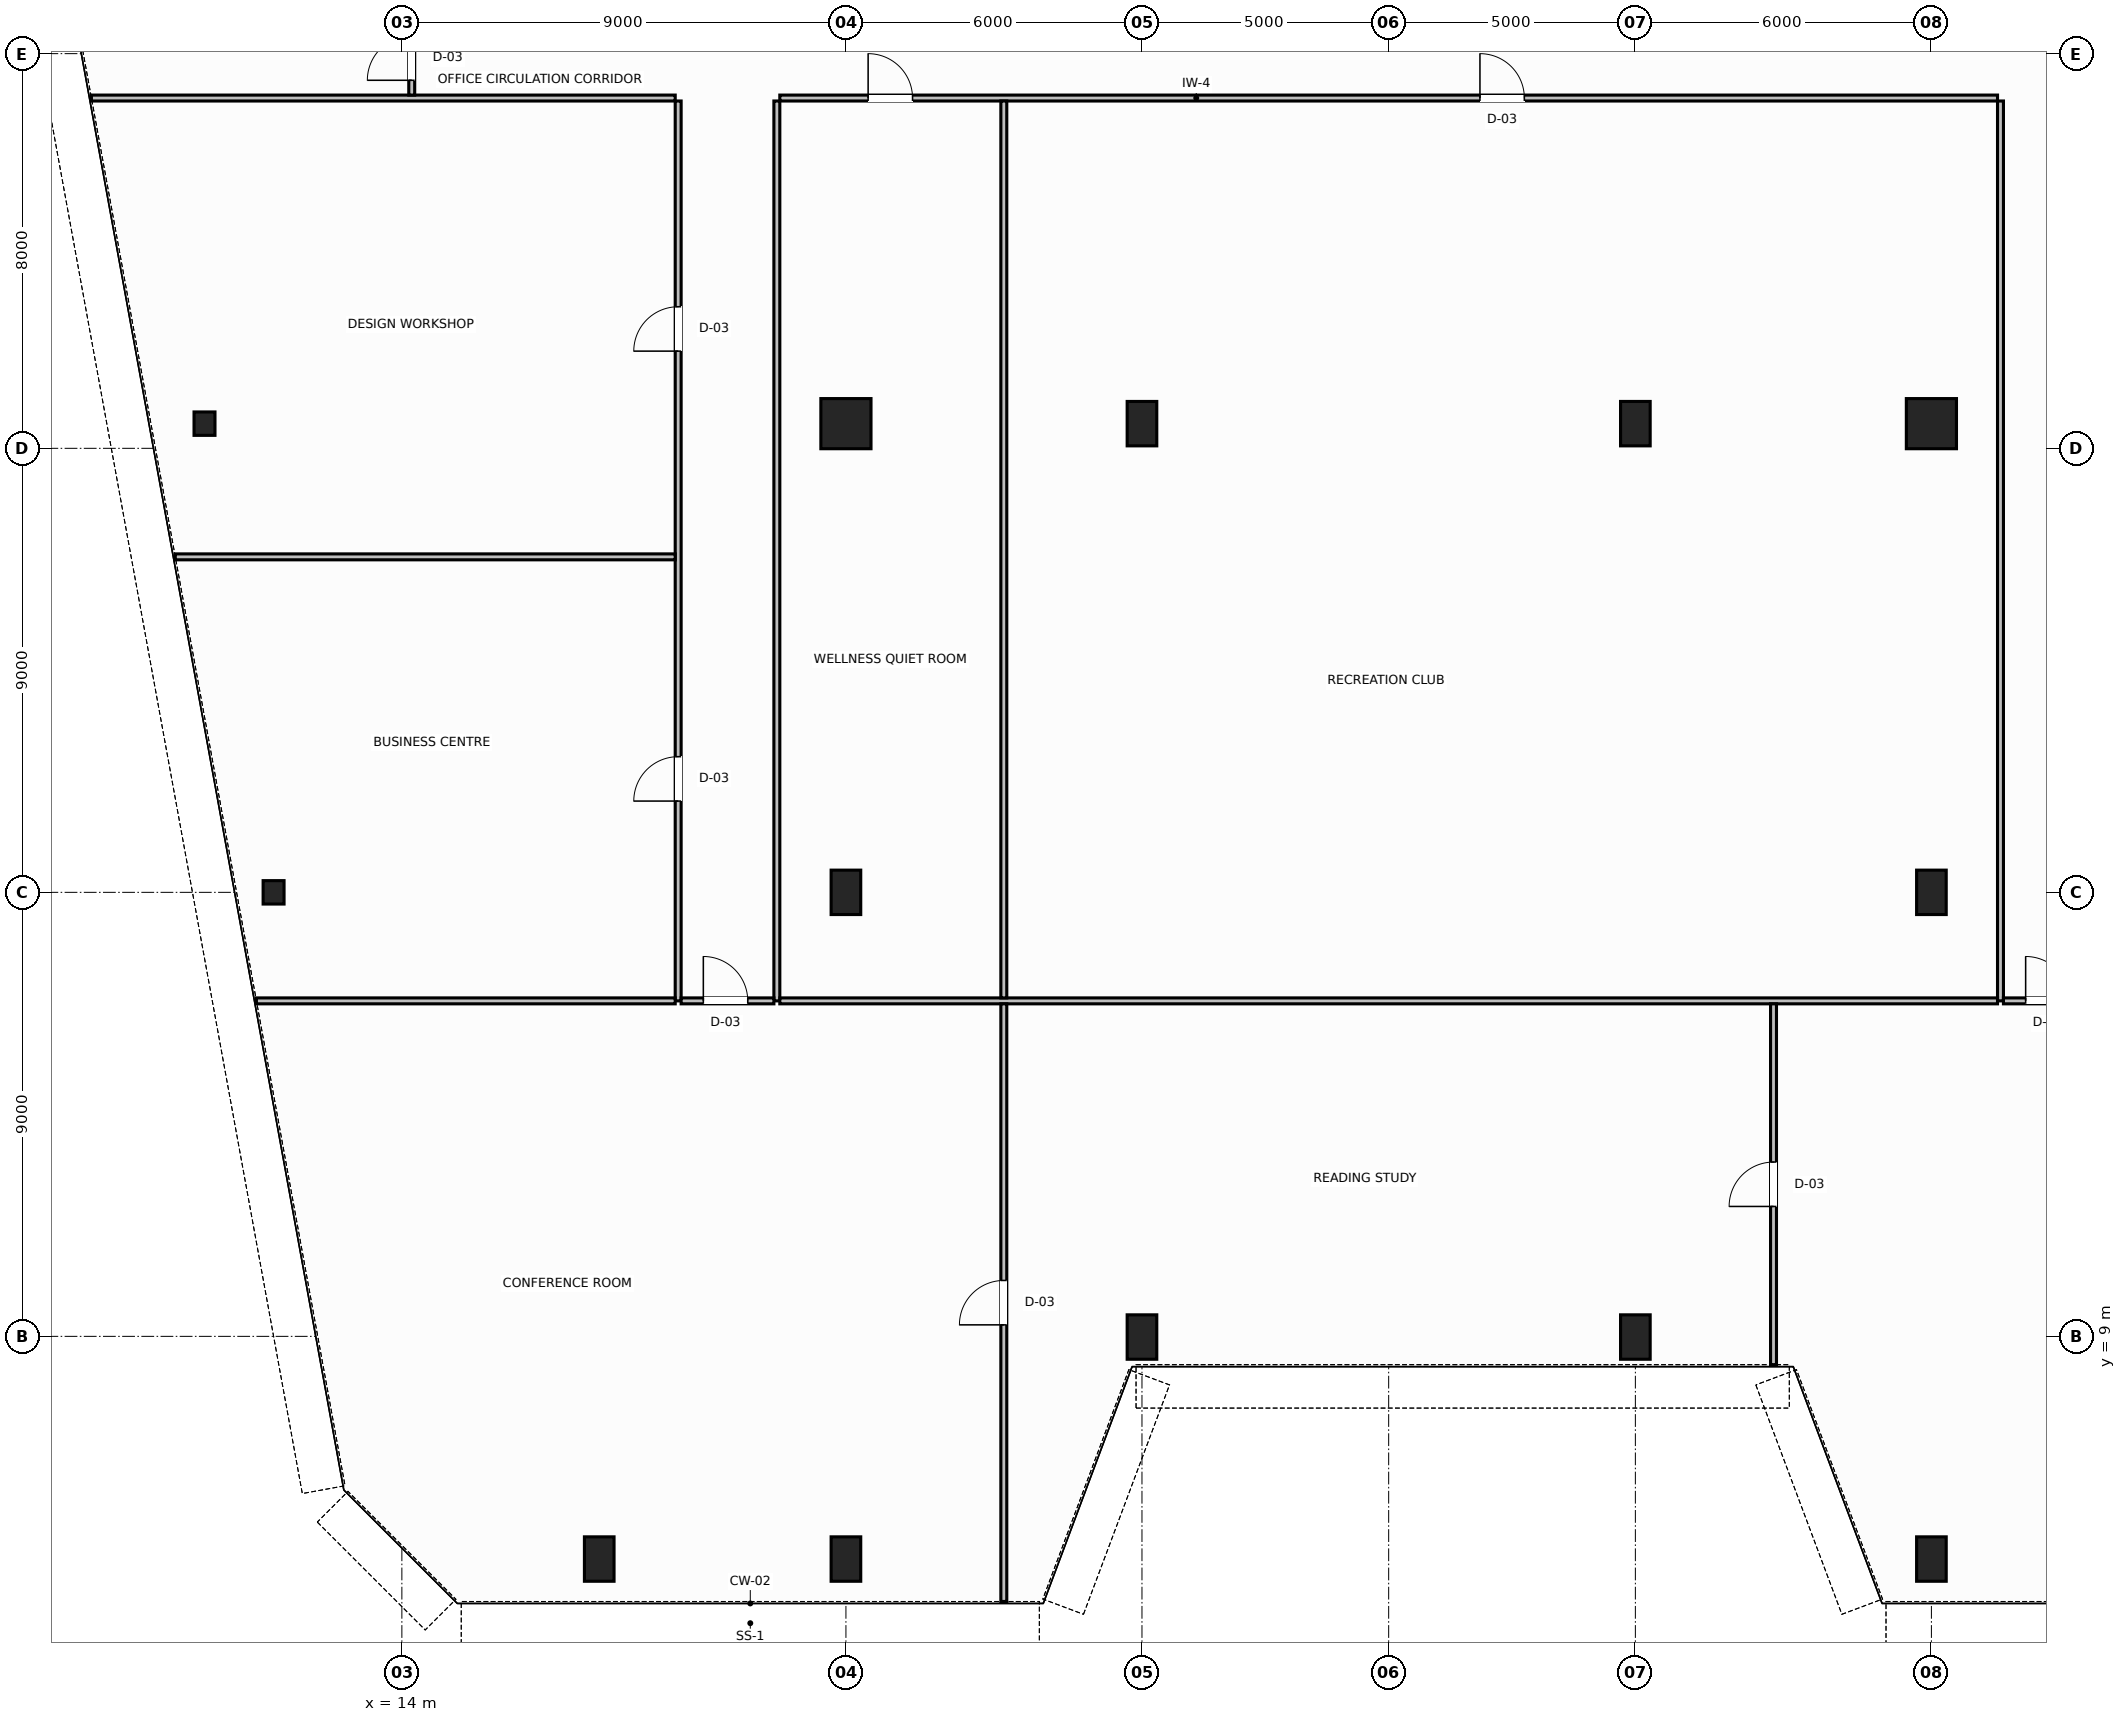
"""IFC4 building model, lengths in metres.
Left out: names, types, materials, properties, quantities, classifications, styles, units other than length and angle.
Written with IfcOpenShell. Run it as: python <this file> out.ifc"""

import sys

from ifc_helpers import new_model, si_unit, direction, frame, frame_2d, origin, origin_2d, place, context, subcontext, project, spatial, rectangle, hollow_rectangle, hollow_circle, i_section, extrude, source, transform, mapped, element, fill, save


model = new_model("IFC4")
c1 = context("Model", 3, precision=1e-05, world=origin(), true_north=direction((0.0, 1.0)))
c2 = subcontext(c1, "Body", "Model", "MODEL_VIEW")
j1 = project(units=[si_unit("LENGTHUNIT", "METRE"), si_unit("PLANEANGLEUNIT", "RADIAN")], contexts=[c1])
p1 = place(None, origin())
s1 = spatial("IfcSite", under=j1, at=p1, CompositionType="ELEMENT")
p2 = place(p1, origin())
s2 = spatial("IfcBuilding", under=s1, at=p2, CompositionType="ELEMENT")
p3 = place(p2, frame((0.0, 0.0, 88.2)))
s3 = spatial("IfcBuildingStorey", under=s2, at=p3, CompositionType="ELEMENT", Elevation=88.2)
m1 = source(origin(), c2, "Body", "SweptSolid", [
    extrude(i_section(OverallWidth=0.424, OverallDepth=0.474, WebThickness=0.047, FlangeThickness=0.065, FilletRadius=0.015, at=origin_2d()), origin(), (0.0, 0.0, 1.0), 3.8),
])
for number, where, z_axis, x_axis in (
    (1, (10.0, 27.5, 0.0), (0.0, 0.0, 1.0), (1.0, 0.0, 0.0)),
    (2, (11.4, 18.0, 0.0), (0.0, 0.0, 1.0), (1.0, 0.0, 0.0)),
):
    element("IfcColumn", number, at=place(p3, frame(where, z_axis=z_axis, x_axis=x_axis)), inside=s3, PredefinedType="COLUMN", context=c2, shape_type="MappedRepresentation", body=[
        mapped(m1, transform((0.0, 0.0, 0.0), scale=1.0)),
    ])
m2 = source(origin(), c2, "Body", "SweptSolid", [
    extrude(hollow_circle(Radius=0.508, WallThickness=0.045, at=origin_2d()), origin(), (0.0, 0.0, 1.0), 3.8),
])
p4 = place(p3, frame((23.0, 27.5, 0.0), z_axis=(0.0, 0.0, 1.0), x_axis=(1.0, 0.0, 0.0)))
e3 = element("IfcColumn", 3, at=p4, inside=s3, PredefinedType="COLUMN", context=c2, shape_type="MappedRepresentation", body=[
    mapped(m2, transform((0.0, 0.0, 0.0), scale=1.0)),
])
m3 = source(origin(), c2, "Body", "SweptSolid", [
    extrude(hollow_rectangle(XDim=0.6, YDim=0.9, WallThickness=0.04, InnerFilletRadius=0.04, OuterFilletRadius=0.08, at=origin_2d()), origin(), (0.0, 0.0, 1.0), 3.8),
])
for number, where, z_axis, x_axis in (
    (4, (29.0, 27.5, 0.0), (0.0, 0.0, 1.0), (1.0, 0.0, 0.0)),
    (5, (39.0, 27.5, 0.0), (0.0, 0.0, 1.0), (1.0, 0.0, 0.0)),
):
    element("IfcColumn", number, at=place(p3, frame(where, z_axis=z_axis, x_axis=x_axis)), inside=s3, PredefinedType="COLUMN", context=c2, shape_type="MappedRepresentation", body=[
        mapped(m3, transform((0.0, 0.0, 0.0), scale=1.0)),
    ])
p5 = place(p3, frame((45.0, 27.5, 0.0), z_axis=(0.0, 0.0, 1.0), x_axis=(1.0, 0.0, 0.0)))
e6 = element("IfcColumn", 6, at=p5, inside=s3, PredefinedType="COLUMN", context=c2, shape_type="MappedRepresentation", body=[
    mapped(m2, transform((0.0, 0.0, 0.0), scale=1.0)),
])
for number, where, z_axis, x_axis in (
    (7, (23.0, 18.0, 0.0), (0.0, 0.0, 1.0), (1.0, 0.0, 0.0)),
    (8, (45.0, 18.0, 0.0), (0.0, 0.0, 1.0), (1.0, 0.0, 0.0)),
):
    element("IfcColumn", number, at=place(p3, frame(where, z_axis=z_axis, x_axis=x_axis)), inside=s3, PredefinedType="COLUMN", context=c2, shape_type="MappedRepresentation", body=[
        mapped(m3, transform((0.0, 0.0, 0.0), scale=1.0)),
    ])
m4 = source(origin(), c2, "Body", "SweptSolid", [
    extrude(hollow_rectangle(XDim=0.6, YDim=0.9, WallThickness=0.04, InnerFilletRadius=0.04, OuterFilletRadius=0.08, at=origin_2d()), origin(), (0.0, 0.0, 1.0), 3.744),
])
for number, where, z_axis, x_axis in (
    (9, (18.0, 4.486, 0.032), (0.0, -0.064, 0.998), (1.0, 0.0, 0.0)),
    (10, (23.0, 4.486, 0.032), (0.0, -0.064, 0.998), (1.0, 0.0, 0.0)),
    (11, (29.0, 8.986, 0.032), (0.0, -0.064, 0.998), (1.0, 0.0, 0.0)),
    (12, (39.0, 8.986, 0.032), (0.0, -0.064, 0.998), (1.0, 0.0, 0.0)),
    (13, (45.0, 4.486, 0.032), (0.0, -0.064, 0.998), (1.0, 0.0, 0.0)),
):
    element("IfcColumn", number, at=place(p3, frame(where, z_axis=z_axis, x_axis=x_axis)), inside=s3, PredefinedType="COLUMN", context=c2, shape_type="MappedRepresentation", body=[
        mapped(m4, transform((0.0, 0.0, 0.0), scale=1.0)),
    ])
p6 = place(p3, frame((21.66, 34.1, 0.0), z_axis=(0.0, 0.0, 1.0), x_axis=(1.0, 0.0, 0.0)))
e14 = element("IfcWall", 14, at=p6, inside=s3, PredefinedType="PARTITIONING", context=c2, shape_type="SweptSolid", body=[
    extrude(rectangle(XDim=24.68, YDim=0.12, at=frame_2d((12.34, 0.0))), origin(), (0.0, 0.0, 1.0), 3.58),
])
p7 = place(p6, frame((1.79, 0.0, 0.0)))
e15 = element("IfcOpeningElement", 15, at=p7, cuts=e14, PredefinedType="OPENING", context=c2, shape_type="SweptSolid", body=[
    extrude(rectangle(XDim=0.9, YDim=2.15, at=frame_2d((0.45, 1.075))), frame((0.0, 0.07, 0.0), z_axis=(0.0, -1.0, 0.0), x_axis=(1.0, 0.0, 0.0)), (0.0, 0.0, 1.0), 0.14),
])
p8 = place(p6, frame((14.19, 0.0, 0.0)))
e16 = element("IfcOpeningElement", 16, at=p8, cuts=e14, PredefinedType="OPENING", context=c2, shape_type="SweptSolid", body=[
    extrude(rectangle(XDim=0.9, YDim=2.15, at=frame_2d((0.45, 1.075))), frame((0.0, 0.07, 0.0), z_axis=(0.0, -1.0, 0.0), x_axis=(1.0, 0.0, 0.0)), (0.0, 0.0, 1.0), 0.14),
])
p9 = place(p3, frame((7.708, 34.1, 0.0), z_axis=(0.0, 0.0, 1.0), x_axis=(1.0, 0.0, 0.0)))
e17 = element("IfcWall", 17, at=p9, inside=s3, PredefinedType="PARTITIONING", context=c2, shape_type="SweptSolid", body=[
    extrude(rectangle(XDim=11.832, YDim=0.12, at=frame_2d((5.916, 0.0))), origin(), (0.0, 0.0, 1.0), 3.58),
])
p10 = place(p3, frame((14.2, 34.16, 0.0), z_axis=(0.0, 0.0, 1.0), x_axis=(0.0, 1.0, 0.0)))
e18 = element("IfcWall", 18, at=p10, inside=s3, PredefinedType="PARTITIONING", context=c2, shape_type="SweptSolid", body=[
    extrude(rectangle(XDim=2.28, YDim=0.12, at=frame_2d((1.14, 0.0))), origin(), (0.0, 0.0, 1.0), 3.58),
])
p11 = place(p10, frame((0.3, 0.0, 0.0)))
e19 = element("IfcOpeningElement", 19, at=p11, cuts=e18, PredefinedType="OPENING", context=c2, shape_type="SweptSolid", body=[
    extrude(rectangle(XDim=0.9, YDim=2.15, at=frame_2d((0.45, 1.075))), frame((0.0, 0.07, 0.0), z_axis=(0.0, -1.0, 0.0), x_axis=(1.0, 0.0, 0.0)), (0.0, 0.0, 1.0), 0.14),
])
p12 = place(p3, frame((19.6, 15.8, 0.0), z_axis=(0.0, 0.0, 1.0), x_axis=(0.0, 1.0, 0.0)))
e20 = element("IfcWall", 20, at=p12, inside=s3, PredefinedType="PARTITIONING", context=c2, shape_type="SweptSolid", body=[
    extrude(rectangle(XDim=18.24, YDim=0.12, at=frame_2d((9.12, 0.0))), origin(), (0.0, 0.0, 1.0), 3.58),
])
p13 = place(p12, frame((4.05, 0.0, 0.0)))
e21 = element("IfcOpeningElement", 21, at=p13, cuts=e20, PredefinedType="OPENING", context=c2, shape_type="SweptSolid", body=[
    extrude(rectangle(XDim=0.9, YDim=2.15, at=frame_2d((0.45, 1.075))), frame((0.0, 0.07, 0.0), z_axis=(0.0, -1.0, 0.0), x_axis=(1.0, 0.0, 0.0)), (0.0, 0.0, 1.0), 0.14),
])
p14 = place(p12, frame((13.17, 0.0, 0.0)))
e22 = element("IfcOpeningElement", 22, at=p14, cuts=e20, PredefinedType="OPENING", context=c2, shape_type="SweptSolid", body=[
    extrude(rectangle(XDim=0.9, YDim=2.15, at=frame_2d((0.45, 1.075))), frame((0.0, 0.07, 0.0), z_axis=(0.0, -1.0, 0.0), x_axis=(1.0, 0.0, 0.0)), (0.0, 0.0, 1.0), 0.14),
])
for number, where, z_axis, x_axis in (
    (23, (21.6, 15.8, 0.0), (0.0, 0.0, 1.0), (0.0, 1.0, 0.0)),
    (24, (46.4, 15.8, 0.0), (0.0, 0.0, 1.0), (0.0, 1.0, 0.0)),
):
    element("IfcWall", number, at=place(p3, frame(where, z_axis=z_axis, x_axis=x_axis)), inside=s3, PredefinedType="PARTITIONING", context=c2, shape_type="SweptSolid", body=[
        extrude(rectangle(XDim=18.24, YDim=0.12, at=frame_2d((9.12, 0.0))), origin(), (0.0, 0.0, 1.0), 3.58),
    ])
p15 = place(p3, frame((19.66, 15.8, 0.0), z_axis=(0.0, 0.0, 1.0), x_axis=(1.0, 0.0, 0.0)))
e25 = element("IfcWall", 25, at=p15, inside=s3, PredefinedType="PARTITIONING", context=c2, shape_type="SweptSolid", body=[
    extrude(rectangle(XDim=1.88, YDim=0.12, at=frame_2d((0.94, 0.0))), origin(), (0.0, 0.0, 1.0), 3.58),
])
p16 = place(p15, frame((0.45, 0.0, 0.0)))
e26 = element("IfcOpeningElement", 26, at=p16, cuts=e25, PredefinedType="OPENING", context=c2, shape_type="SweptSolid", body=[
    extrude(rectangle(XDim=0.9, YDim=2.15, at=frame_2d((0.45, 1.075))), frame((0.0, 0.07, 0.0), z_axis=(0.0, -1.0, 0.0), x_axis=(1.0, 0.0, 0.0)), (0.0, 0.0, 1.0), 0.14),
])
p17 = place(p3, frame((46.46, 15.8, 0.0), z_axis=(0.0, 0.0, 1.0), x_axis=(1.0, 0.0, 0.0)))
e27 = element("IfcWall", 27, at=p17, inside=s3, PredefinedType="PARTITIONING", context=c2, shape_type="SweptSolid", body=[
    extrude(rectangle(XDim=1.88, YDim=0.12, at=frame_2d((0.94, 0.0))), origin(), (0.0, 0.0, 1.0), 3.58),
])
p18 = place(p17, frame((0.45, 0.0, 0.0)))
e28 = element("IfcOpeningElement", 28, at=p18, cuts=e27, PredefinedType="OPENING", context=c2, shape_type="SweptSolid", body=[
    extrude(rectangle(XDim=0.9, YDim=2.15, at=frame_2d((0.45, 1.075))), frame((0.0, 0.07, 0.0), z_axis=(0.0, -1.0, 0.0), x_axis=(1.0, 0.0, 0.0)), (0.0, 0.0, 1.0), 0.14),
])
p19 = place(p3, frame((11.052, 15.8, 0.0), z_axis=(0.0, 0.0, 1.0), x_axis=(1.0, 0.0, 0.0)))
e29 = element("IfcWall", 29, at=p19, inside=s3, PredefinedType="PARTITIONING", context=c2, shape_type="SweptSolid", body=[
    extrude(rectangle(XDim=8.488, YDim=0.12, at=frame_2d((4.244, 0.0))), origin(), (0.0, 0.0, 1.0), 3.58),
])
p20 = place(p3, frame((9.407, 24.8, 0.0), z_axis=(0.0, 0.0, 1.0), x_axis=(1.0, 0.0, 0.0)))
e30 = element("IfcWall", 30, at=p20, inside=s3, PredefinedType="PARTITIONING", context=c2, shape_type="SweptSolid", body=[
    extrude(rectangle(XDim=10.133, YDim=0.12, at=frame_2d((5.066, 0.0))), origin(), (0.0, 0.0, 1.0), 3.58),
])
p21 = place(p3, frame((21.66, 15.8, 0.0), z_axis=(0.0, 0.0, 1.0), x_axis=(1.0, 0.0, 0.0)))
e31 = element("IfcWall", 31, at=p21, inside=s3, PredefinedType="PARTITIONING", context=c2, shape_type="SweptSolid", body=[
    extrude(rectangle(XDim=24.68, YDim=0.12, at=frame_2d((12.34, 0.0))), origin(), (0.0, 0.0, 1.0), 3.58),
])
p22 = place(p3, frame((26.2, 15.86, 0.0), z_axis=(0.0, 0.0, 1.0), x_axis=(0.0, 1.0, 0.0)))
e32 = element("IfcWall", 32, at=p22, inside=s3, PredefinedType="PARTITIONING", context=c2, shape_type="SweptSolid", body=[
    extrude(rectangle(XDim=18.18, YDim=0.12, at=frame_2d((9.09, 0.0))), origin(), (0.0, 0.0, 1.0), 3.58),
])
p23 = place(p3, frame((26.2, 3.626, 0.0), z_axis=(0.0, 0.0, 1.0), x_axis=(0.0, 1.0, 0.0)))
e33 = element("IfcWall", 33, at=p23, inside=s3, PredefinedType="PARTITIONING", context=c2, shape_type="SweptSolid", body=[
    extrude(rectangle(XDim=12.114, YDim=0.12, at=frame_2d((6.057, 0.0))), origin(), (0.0, 0.0, 1.0), 3.58),
])
p24 = place(p23, frame((5.607, 0.0, 0.0)))
e34 = element("IfcOpeningElement", 34, at=p24, cuts=e33, PredefinedType="OPENING", context=c2, shape_type="SweptSolid", body=[
    extrude(rectangle(XDim=0.9, YDim=2.15, at=frame_2d((0.45, 1.075))), frame((0.0, 0.07, 0.0), z_axis=(0.0, -1.0, 0.0), x_axis=(1.0, 0.0, 0.0)), (0.0, 0.0, 1.0), 0.14),
])
p25 = place(p3, frame((41.8, 8.426, 0.0), z_axis=(0.0, 0.0, 1.0), x_axis=(0.0, 1.0, 0.0)))
e35 = element("IfcWall", 35, at=p25, inside=s3, PredefinedType="PARTITIONING", context=c2, shape_type="SweptSolid", body=[
    extrude(rectangle(XDim=7.314, YDim=0.12, at=frame_2d((3.657, 0.0))), origin(), (0.0, 0.0, 1.0), 3.58),
])
p26 = place(p25, frame((3.207, 0.0, 0.0)))
e36 = element("IfcOpeningElement", 36, at=p26, cuts=e35, PredefinedType="OPENING", context=c2, shape_type="SweptSolid", body=[
    extrude(rectangle(XDim=0.9, YDim=2.15, at=frame_2d((0.45, 1.075))), frame((0.0, 0.07, 0.0), z_axis=(0.0, -1.0, 0.0), x_axis=(1.0, 0.0, 0.0)), (0.0, 0.0, 1.0), 0.14),
])
m5 = source(origin(), c2, "Body", "SweptSolid", [
    extrude(rectangle(XDim=0.9, YDim=2.15, at=frame_2d((0.45, 1.075))), frame((0.0, 0.025, 0.0), z_axis=(0.0, -1.0, 0.0), x_axis=(1.0, 0.0, 0.0)), (0.0, 0.0, 1.0), 0.05),
])
p27 = place(p11, origin())
e37 = element("IfcDoor", 37, at=p27, inside=s3, OperationType="SINGLE_SWING_LEFT", PredefinedType="DOOR", context=c2, shape_type="MappedRepresentation", body=[
    mapped(m5, transform((0.0, 0.0, 0.0), scale=1.0)),
])
fill(e19, e37)
p28 = place(p13, origin())
e38 = element("IfcDoor", 38, at=p28, inside=s3, OperationType="SINGLE_SWING_LEFT", PredefinedType="DOOR", context=c2, shape_type="MappedRepresentation", body=[
    mapped(m5, transform((0.0, 0.0, 0.0), scale=1.0)),
])
fill(e21, e38)
p29 = place(p14, origin())
e39 = element("IfcDoor", 39, at=p29, inside=s3, OperationType="SINGLE_SWING_RIGHT", PredefinedType="DOOR", context=c2, shape_type="MappedRepresentation", body=[
    mapped(m5, transform((0.0, 0.0, 0.0), scale=1.0)),
])
fill(e22, e39)
p30 = place(p7, origin())
e40 = element("IfcDoor", 40, at=p30, inside=s3, OperationType="SINGLE_SWING_LEFT", PredefinedType="DOOR", context=c2, shape_type="MappedRepresentation", body=[
    mapped(m5, transform((0.0, 0.0, 0.0), scale=1.0)),
])
fill(e15, e40)
p31 = place(p8, origin())
e41 = element("IfcDoor", 41, at=p31, inside=s3, OperationType="SINGLE_SWING_RIGHT", PredefinedType="DOOR", context=c2, shape_type="MappedRepresentation", body=[
    mapped(m5, transform((0.0, 0.0, 0.0), scale=1.0)),
])
fill(e16, e41)
p32 = place(p16, origin())
e42 = element("IfcDoor", 42, at=p32, inside=s3, OperationType="SINGLE_SWING_LEFT", PredefinedType="DOOR", context=c2, shape_type="MappedRepresentation", body=[
    mapped(m5, transform((0.0, 0.0, 0.0), scale=1.0)),
])
fill(e26, e42)
p33 = place(p24, origin())
e43 = element("IfcDoor", 43, at=p33, inside=s3, OperationType="SINGLE_SWING_RIGHT", PredefinedType="DOOR", context=c2, shape_type="MappedRepresentation", body=[
    mapped(m5, transform((0.0, 0.0, 0.0), scale=1.0)),
])
fill(e34, e43)
p34 = place(p26, origin())
e44 = element("IfcDoor", 44, at=p34, inside=s3, OperationType="SINGLE_SWING_LEFT", PredefinedType="DOOR", context=c2, shape_type="MappedRepresentation", body=[
    mapped(m5, transform((0.0, 0.0, 0.0), scale=1.0)),
])
fill(e36, e44)
p35 = place(p18, origin())
e45 = element("IfcDoor", 45, at=p35, inside=s3, OperationType="SINGLE_SWING_RIGHT", PredefinedType="DOOR", context=c2, shape_type="MappedRepresentation", body=[
    mapped(m5, transform((0.0, 0.0, 0.0), scale=1.0)),
])
fill(e28, e45)
save(model, sys.argv[1])
